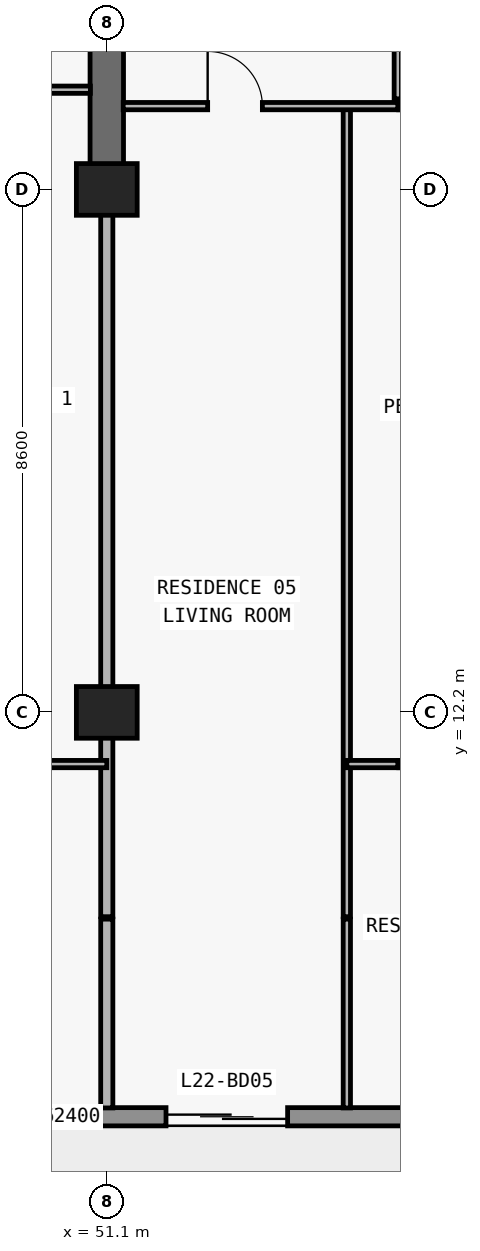
"""IFC4 building model, lengths in metres.
Left out: names, types, materials, properties, quantities, classifications, styles, units other than length and angle.
Written with IfcOpenShell. Run it as: python <this file> out.ifc"""

import sys

from ifc_helpers import new_model, si_unit, direction, frame, frame_2d, origin, origin_2d, place, context, subcontext, project, spatial, rectangle, extrude, element, fill, save


model = new_model("IFC4")
c1 = context("Model", 3, precision=1e-05, world=origin(), true_north=direction((0.0, 1.0)))
c2 = subcontext(c1, "Body", "Model", "MODEL_VIEW")
j1 = project(units=[si_unit("LENGTHUNIT", "METRE"), si_unit("PLANEANGLEUNIT", "RADIAN")], contexts=[c1])
p1 = place(None, origin())
s1 = spatial("IfcSite", under=j1, at=p1, CompositionType="ELEMENT")
p2 = place(p1, origin())
s2 = spatial("IfcBuilding", under=s1, at=p2, CompositionType="ELEMENT")
p3 = place(p2, frame((0.0, 0.0, 84.6)))
s3 = spatial("IfcBuildingStorey", under=s2, at=p3, CompositionType="ELEMENT", Elevation=84.6)
for number, where, z_axis, x_axis in (
    (1, (51.1, 12.2, 0.0), (0.0, 0.0, 1.0), (1.0, 0.0, 0.0)),
    (2, (51.1, 20.8, 0.0), (0.0, 0.0, 1.0), (1.0, 0.0, 0.0)),
):
    element("IfcColumn", number, at=place(p3, frame(where, z_axis=z_axis, x_axis=x_axis)), inside=s3, PredefinedType="COLUMN", context=c2, shape_type="SweptSolid", body=[
        extrude(rectangle(XDim=1.0, YDim=0.85, at=origin_2d()), origin(), (0.0, 0.0, 1.0), 3.05),
    ])
p4 = place(p3, frame((51.1, 20.8, 0.0), z_axis=(0.0, 0.0, 1.0), x_axis=(0.0, 1.0, 0.0)))
e3 = element("IfcWall", 3, at=p4, inside=s3, PredefinedType="SHEAR", context=c2, shape_type="SweptSolid", body=[
    extrude(rectangle(XDim=8.6, YDim=0.55, at=frame_2d((4.3, 0.0))), origin(), (0.0, 0.0, 1.0), 3.05),
])
p5 = place(p3, frame((70.1, 5.55, 0.0), z_axis=(0.0, 0.0, 1.0), x_axis=(-1.0, 0.0, 0.0)))
e4 = element("IfcWall", 4, at=p5, inside=s3, PredefinedType="STANDARD", context=c2, shape_type="SweptSolid", body=[
    extrude(rectangle(XDim=62.4, YDim=0.3, at=frame_2d((31.2, 0.0))), origin(), (0.0, 0.0, 1.0), 3.05),
])
p6 = place(p5, frame((57.226, 0.0, 0.0)))
e5 = element("IfcOpeningElement", 5, at=p6, cuts=e4, PredefinedType="OPENING", context=c2, shape_type="SweptSolid", body=[
    extrude(rectangle(XDim=2.0, YDim=2.3, at=frame_2d((1.0, 1.15))), frame((0.0, 0.16, 0.0), z_axis=(0.0, -1.0, 0.0), x_axis=(1.0, 0.0, 0.0)), (0.0, 0.0, 1.0), 0.32),
])
p7 = place(p5, frame((52.926, 0.0, 0.85)))
e6 = element("IfcOpeningElement", 6, at=p7, cuts=e4, PredefinedType="OPENING", context=c2, shape_type="SweptSolid", body=[
    extrude(rectangle(XDim=2.2, YDim=1.55, at=frame_2d((1.1, 0.775))), frame((0.0, 0.16, 0.0), z_axis=(0.0, -1.0, 0.0), x_axis=(1.0, 0.0, 0.0)), (0.0, 0.0, 1.0), 0.32),
])
p8 = place(p5, frame((48.49, 0.0, 0.0)))
e7 = element("IfcOpeningElement", 7, at=p8, cuts=e4, PredefinedType="OPENING", context=c2, shape_type="SweptSolid", body=[
    extrude(rectangle(XDim=2.0, YDim=2.3, at=frame_2d((1.0, 1.15))), frame((0.0, 0.16, 0.0), z_axis=(0.0, -1.0, 0.0), x_axis=(1.0, 0.0, 0.0)), (0.0, 0.0, 1.0), 0.32),
])
p9 = place(p5, frame((44.39, 0.0, 0.85)))
e8 = element("IfcOpeningElement", 8, at=p9, cuts=e4, PredefinedType="OPENING", context=c2, shape_type="SweptSolid", body=[
    extrude(rectangle(XDim=1.8, YDim=1.55, at=frame_2d((0.9, 0.775))), frame((0.0, 0.16, 0.0), z_axis=(0.0, -1.0, 0.0), x_axis=(1.0, 0.0, 0.0)), (0.0, 0.0, 1.0), 0.32),
])
p10 = place(p5, frame((40.426, 0.0, 0.0)))
e9 = element("IfcOpeningElement", 9, at=p10, cuts=e4, PredefinedType="OPENING", context=c2, shape_type="SweptSolid", body=[
    extrude(rectangle(XDim=2.0, YDim=2.3, at=frame_2d((1.0, 1.15))), frame((0.0, 0.16, 0.0), z_axis=(0.0, -1.0, 0.0), x_axis=(1.0, 0.0, 0.0)), (0.0, 0.0, 1.0), 0.32),
])
p11 = place(p5, frame((36.126, 0.0, 0.85)))
e10 = element("IfcOpeningElement", 10, at=p11, cuts=e4, PredefinedType="OPENING", context=c2, shape_type="SweptSolid", body=[
    extrude(rectangle(XDim=2.2, YDim=1.55, at=frame_2d((1.1, 0.775))), frame((0.0, 0.16, 0.0), z_axis=(0.0, -1.0, 0.0), x_axis=(1.0, 0.0, 0.0)), (0.0, 0.0, 1.0), 0.32),
])
p12 = place(p5, frame((32.09, 0.0, 0.0)))
e11 = element("IfcOpeningElement", 11, at=p12, cuts=e4, PredefinedType="OPENING", context=c2, shape_type="SweptSolid", body=[
    extrude(rectangle(XDim=2.0, YDim=2.3, at=frame_2d((1.0, 1.15))), frame((0.0, 0.16, 0.0), z_axis=(0.0, -1.0, 0.0), x_axis=(1.0, 0.0, 0.0)), (0.0, 0.0, 1.0), 0.32),
])
p13 = place(p5, frame((28.21, 0.0, 0.65)))
e12 = element("IfcOpeningElement", 12, at=p13, cuts=e4, PredefinedType="OPENING", context=c2, shape_type="SweptSolid", body=[
    extrude(rectangle(XDim=2.6, YDim=1.85, at=frame_2d((1.3, 0.925))), frame((0.0, 0.16, 0.0), z_axis=(0.0, -1.0, 0.0), x_axis=(1.0, 0.0, 0.0)), (0.0, 0.0, 1.0), 0.32),
])
p14 = place(p5, frame((22.1, 0.0, 0.85)))
e13 = element("IfcOpeningElement", 13, at=p14, cuts=e4, PredefinedType="OPENING", context=c2, shape_type="SweptSolid", body=[
    extrude(rectangle(XDim=2.2, YDim=1.55, at=frame_2d((1.1, 0.775))), frame((0.0, 0.16, 0.0), z_axis=(0.0, -1.0, 0.0), x_axis=(1.0, 0.0, 0.0)), (0.0, 0.0, 1.0), 0.32),
])
p15 = place(p5, frame((16.026, 0.0, 0.0)))
e14 = element("IfcOpeningElement", 14, at=p15, cuts=e4, PredefinedType="OPENING", context=c2, shape_type="SweptSolid", body=[
    extrude(rectangle(XDim=2.0, YDim=2.3, at=frame_2d((1.0, 1.15))), frame((0.0, 0.16, 0.0), z_axis=(0.0, -1.0, 0.0), x_axis=(1.0, 0.0, 0.0)), (0.0, 0.0, 1.0), 0.32),
])
p16 = place(p5, frame((11.726, 0.0, 0.85)))
e15 = element("IfcOpeningElement", 15, at=p16, cuts=e4, PredefinedType="OPENING", context=c2, shape_type="SweptSolid", body=[
    extrude(rectangle(XDim=2.2, YDim=1.55, at=frame_2d((1.1, 0.775))), frame((0.0, 0.16, 0.0), z_axis=(0.0, -1.0, 0.0), x_axis=(1.0, 0.0, 0.0)), (0.0, 0.0, 1.0), 0.32),
])
p17 = place(p5, frame((7.29, 0.0, 0.0)))
e16 = element("IfcOpeningElement", 16, at=p17, cuts=e4, PredefinedType="OPENING", context=c2, shape_type="SweptSolid", body=[
    extrude(rectangle(XDim=2.0, YDim=2.3, at=frame_2d((1.0, 1.15))), frame((0.0, 0.16, 0.0), z_axis=(0.0, -1.0, 0.0), x_axis=(1.0, 0.0, 0.0)), (0.0, 0.0, 1.0), 0.32),
])
p18 = place(p5, frame((3.19, 0.0, 0.85)))
e17 = element("IfcOpeningElement", 17, at=p18, cuts=e4, PredefinedType="OPENING", context=c2, shape_type="SweptSolid", body=[
    extrude(rectangle(XDim=1.8, YDim=1.55, at=frame_2d((0.9, 0.775))), frame((0.0, 0.16, 0.0), z_axis=(0.0, -1.0, 0.0), x_axis=(1.0, 0.0, 0.0)), (0.0, 0.0, 1.0), 0.32),
])
p19 = place(p3, frame((51.1, 5.695, 0.0), z_axis=(0.0, 0.0, 1.0), x_axis=(0.0, 1.0, 0.0)))
e18 = element("IfcWall", 18, at=p19, inside=s3, PredefinedType="PARTITIONING", context=c2, shape_type="SweptSolid", body=[
    extrude(rectangle(XDim=3.105, YDim=0.2, at=frame_2d((1.552, 0.0))), origin(), (0.0, 0.0, 1.0), 3.05),
])
p20 = place(p3, frame((51.1, 8.84, 0.0), z_axis=(0.0, 0.0, 1.0), x_axis=(0.0, 1.0, 0.0)))
e19 = element("IfcWall", 19, at=p20, inside=s3, PredefinedType="PARTITIONING", context=c2, shape_type="SweptSolid", body=[
    extrude(rectangle(XDim=11.955, YDim=0.2, at=frame_2d((5.978, 0.0))), origin(), (0.0, 0.0, 1.0), 2.174),
])
p21 = place(p3, frame((55.048, 5.695, 0.0), z_axis=(0.0, 0.0, 1.0), x_axis=(0.0, 1.0, 0.0)))
e20 = element("IfcWall", 20, at=p21, inside=s3, PredefinedType="PARTITIONING", context=c2, shape_type="SweptSolid", body=[
    extrude(rectangle(XDim=3.105, YDim=0.12, at=frame_2d((1.552, 0.0))), origin(), (0.0, 0.0, 1.0), 3.05),
])
p22 = place(p3, frame((55.048, 8.84, 0.0), z_axis=(0.0, 0.0, 1.0), x_axis=(0.0, 1.0, 0.0)))
e21 = element("IfcWall", 21, at=p22, inside=s3, PredefinedType="PARTITIONING", context=c2, shape_type="SweptSolid", body=[
    extrude(rectangle(XDim=13.33, YDim=0.12, at=frame_2d((6.665, 0.0))), origin(), (0.0, 0.0, 1.0), 3.05),
])
p23 = place(p3, frame((55.886, 22.29, 0.0), z_axis=(0.0, 0.0, 1.0), x_axis=(0.0, 1.0, 0.0)))
e22 = element("IfcWall", 22, at=p23, inside=s3, PredefinedType="PARTITIONING", context=c2, shape_type="SweptSolid", body=[
    extrude(rectangle(XDim=4.69, YDim=0.12, at=frame_2d((2.345, 0.0))), origin(), (0.0, 0.0, 1.0), 3.05),
])
p24 = place(p23, frame((1.895, 0.0, 0.0)))
e23 = element("IfcOpeningElement", 23, at=p24, cuts=e22, PredefinedType="OPENING", context=c2, shape_type="SweptSolid", body=[
    extrude(rectangle(XDim=0.9, YDim=2.15, at=frame_2d((0.45, 1.075))), frame((0.0, 0.07, 0.0), z_axis=(0.0, -1.0, 0.0), x_axis=(1.0, 0.0, 0.0)), (0.0, 0.0, 1.0), 0.14),
])
p25 = place(p3, frame((42.7, 11.35, 0.0), z_axis=(0.0, 0.0, 1.0), x_axis=(1.0, 0.0, 0.0)))
e24 = element("IfcWall", 24, at=p25, inside=s3, PredefinedType="PARTITIONING", context=c2, shape_type="SweptSolid", body=[
    extrude(rectangle(XDim=8.4, YDim=0.12, at=frame_2d((4.2, 0.0))), origin(), (0.0, 0.0, 1.0), 3.05),
])
p26 = place(p25, frame((3.75, 0.0, 0.0)))
e25 = element("IfcOpeningElement", 25, at=p26, cuts=e24, PredefinedType="OPENING", context=c2, shape_type="SweptSolid", body=[
    extrude(rectangle(XDim=0.9, YDim=2.15, at=frame_2d((0.45, 1.075))), frame((0.0, 0.07, 0.0), z_axis=(0.0, -1.0, 0.0), x_axis=(1.0, 0.0, 0.0)), (0.0, 0.0, 1.0), 0.14),
])
p27 = place(p3, frame((55.048, 11.35, 0.0), z_axis=(0.0, 0.0, 1.0), x_axis=(1.0, 0.0, 0.0)))
e26 = element("IfcWall", 26, at=p27, inside=s3, PredefinedType="PARTITIONING", context=c2, shape_type="SweptSolid", body=[
    extrude(rectangle(XDim=0.838, YDim=0.12, at=frame_2d((0.419, 0.0))), origin(), (0.0, 0.0, 1.0), 3.05),
])
p28 = place(p3, frame((55.9, 11.35, 0.0), z_axis=(0.0, 0.0, 1.0), x_axis=(1.0, 0.0, 0.0)))
e27 = element("IfcWall", 27, at=p28, inside=s3, PredefinedType="PARTITIONING", context=c2, shape_type="SweptSolid", body=[
    extrude(rectangle(XDim=3.6, YDim=0.12, at=frame_2d((1.8, 0.0))), origin(), (0.0, 0.0, 1.0), 3.05),
])
p29 = place(p28, frame((1.35, 0.0, 0.0)))
e28 = element("IfcOpeningElement", 28, at=p29, cuts=e27, PredefinedType="OPENING", context=c2, shape_type="SweptSolid", body=[
    extrude(rectangle(XDim=0.9, YDim=2.15, at=frame_2d((0.45, 1.075))), frame((0.0, 0.07, 0.0), z_axis=(0.0, -1.0, 0.0), x_axis=(1.0, 0.0, 0.0)), (0.0, 0.0, 1.0), 0.14),
])
p30 = place(p3, frame((51.37, 22.17, 0.0), z_axis=(0.0, 0.0, 1.0), x_axis=(1.0, 0.0, 0.0)))
e29 = element("IfcWall", 29, at=p30, inside=s3, PredefinedType="PARTITIONING", context=c2, shape_type="SweptSolid", body=[
    extrude(rectangle(XDim=4.516, YDim=0.12, at=frame_2d((2.258, 0.0))), origin(), (0.0, 0.0, 1.0), 3.05),
])
p31 = place(p30, frame((1.389, 0.0, 0.0)))
e30 = element("IfcOpeningElement", 30, at=p31, cuts=e29, PredefinedType="OPENING", context=c2, shape_type="SweptSolid", body=[
    extrude(rectangle(XDim=0.9, YDim=2.15, at=frame_2d((0.45, 1.075))), frame((0.0, 0.07, 0.0), z_axis=(0.0, -1.0, 0.0), x_axis=(1.0, 0.0, 0.0)), (0.0, 0.0, 1.0), 0.14),
])
p32 = place(p3, frame((55.9, 22.17, 0.0), z_axis=(0.0, 0.0, 1.0), x_axis=(1.0, 0.0, 0.0)))
e31 = element("IfcWall", 31, at=p32, inside=s3, PredefinedType="PARTITIONING", context=c2, shape_type="SweptSolid", body=[
    extrude(rectangle(XDim=3.6, YDim=0.12, at=frame_2d((1.8, 0.0))), origin(), (0.0, 0.0, 1.0), 3.05),
])
p33 = place(p32, frame((1.35, 0.0, 0.0)))
e32 = element("IfcOpeningElement", 32, at=p33, cuts=e31, PredefinedType="OPENING", context=c2, shape_type="SweptSolid", body=[
    extrude(rectangle(XDim=0.9, YDim=2.15, at=frame_2d((0.45, 1.075))), frame((0.0, 0.07, 0.0), z_axis=(0.0, -1.0, 0.0), x_axis=(1.0, 0.0, 0.0)), (0.0, 0.0, 1.0), 0.14),
])
p34 = place(p3, frame((42.7, 22.44, 0.0), z_axis=(0.0, 0.0, 1.0), x_axis=(1.0, 0.0, 0.0)))
e33 = element("IfcWall", 33, at=p34, inside=s3, PredefinedType="PARTITIONING", context=c2, shape_type="SweptSolid", body=[
    extrude(rectangle(XDim=8.13, YDim=0.12, at=frame_2d((4.065, 0.0))), origin(), (0.0, 0.0, 1.0), 3.05),
])
p35 = place(p34, frame((3.615, 0.0, 0.0)))
e34 = element("IfcOpeningElement", 34, at=p35, cuts=e33, PredefinedType="OPENING", context=c2, shape_type="SweptSolid", body=[
    extrude(rectangle(XDim=0.9, YDim=2.15, at=frame_2d((0.45, 1.075))), frame((0.0, 0.07, 0.0), z_axis=(0.0, -1.0, 0.0), x_axis=(1.0, 0.0, 0.0)), (0.0, 0.0, 1.0), 0.14),
])
p36 = place(p15, origin())
e35 = element("IfcDoor", 35, at=p36, inside=s3, OperationType="DOUBLE_DOOR_SLIDING", PredefinedType="DOOR", context=c2, shape_type="SweptSolid", body=[
    extrude(rectangle(XDim=2.0, YDim=2.3, at=frame_2d((1.0, 1.15))), frame((0.0, 0.025, 0.0), z_axis=(0.0, -1.0, 0.0), x_axis=(1.0, 0.0, 0.0)), (0.0, 0.0, 1.0), 0.05),
])
fill(e14, e35)
p37 = place(p31, origin())
e36 = element("IfcDoor", 36, at=p37, inside=s3, OperationType="SINGLE_SWING_LEFT", PredefinedType="DOOR", context=c2, shape_type="SweptSolid", body=[
    extrude(rectangle(XDim=0.9, YDim=2.15, at=frame_2d((0.45, 1.075))), frame((0.0, 0.025, 0.0), z_axis=(0.0, -1.0, 0.0), x_axis=(1.0, 0.0, 0.0)), (0.0, 0.0, 1.0), 0.05),
])
fill(e30, e36)
save(model, sys.argv[1])
